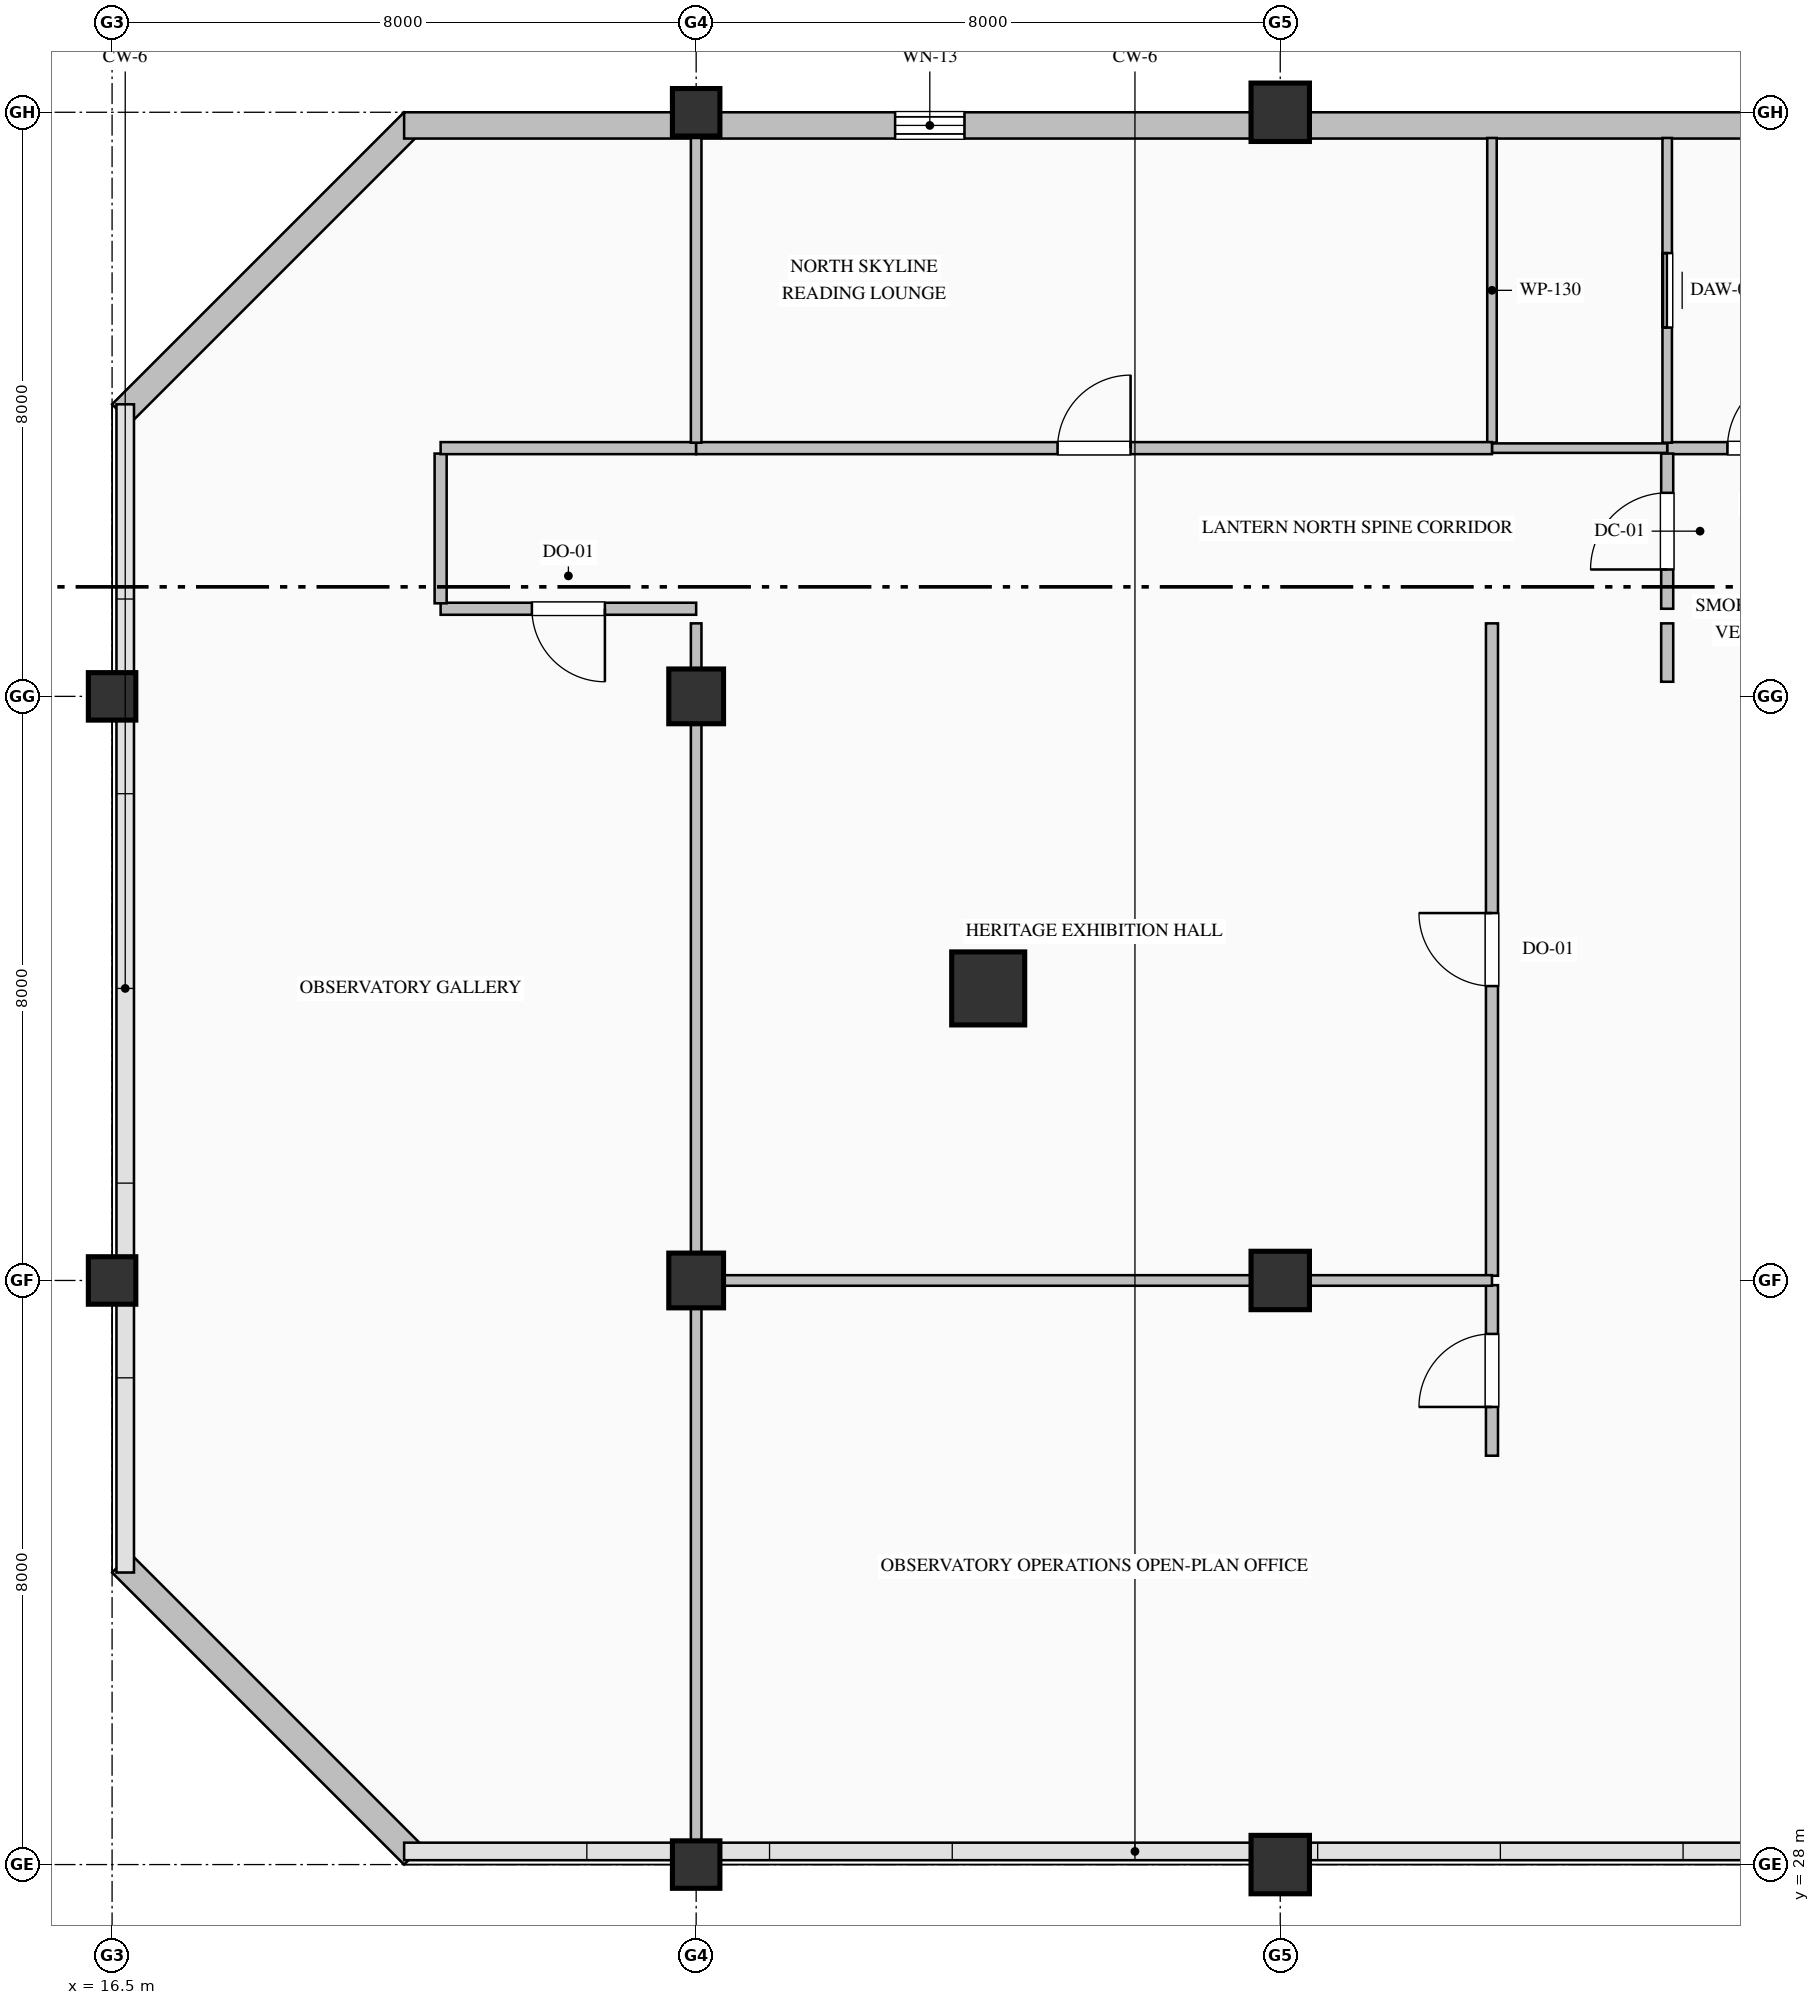
"""IFC4 building model, lengths in metres.
Left out: names, types, materials, properties, quantities, classifications, styles, units other than length and angle.
Written with IfcOpenShell. Run it as: python <this file> out.ifc"""

import sys

from ifc_helpers import new_model, si_unit, direction, frame, frame_2d, origin, origin_2d, place, context, subcontext, project, spatial, rectangle, hollow_rectangle, hollow_circle, extrude, element, fill, save


model = new_model("IFC4")
c1 = context("Model", 3, precision=1e-05, world=origin(), true_north=direction((0.0, 1.0)))
c2 = subcontext(c1, "Body", "Model", "MODEL_VIEW")
j1 = project(units=[si_unit("LENGTHUNIT", "METRE"), si_unit("PLANEANGLEUNIT", "RADIAN")], contexts=[c1])
p1 = place(None, origin())
s1 = spatial("IfcSite", under=j1, at=p1, CompositionType="ELEMENT")
p2 = place(p1, origin())
s2 = spatial("IfcBuilding", under=s1, at=p2, CompositionType="ELEMENT")
p3 = place(p2, frame((0.0, 0.0, 373.0)))
s3 = spatial("IfcBuildingStorey", under=s2, at=p3, CompositionType="ELEMENT", Elevation=373.0)
for number, where, z_axis, x_axis in (
    (1, (16.5, 36.0, 0.0), (0.0, 0.0, 1.0), (1.0, 0.0, 0.0)),
    (2, (16.5, 44.0, 0.0), (0.0, 0.0, 1.0), (1.0, 0.0, 0.0)),
    (3, (24.5, 28.0, 0.0), (0.0, 0.0, 1.0), (1.0, 0.0, 0.0)),
):
    element("IfcColumn", number, at=place(p3, frame(where, z_axis=z_axis, x_axis=x_axis)), inside=s3, PredefinedType="COLUMN", context=c2, shape_type="SweptSolid", body=[
        extrude(hollow_rectangle(XDim=0.65, YDim=0.65, WallThickness=0.028, at=origin_2d()), origin(), (0.0, 0.0, 1.0), 5.4),
    ])
for number, where, z_axis, x_axis in (
    (4, (24.5, 36.0, 0.0), (0.0, 0.0, 1.0), (1.0, 0.0, 0.0)),
    (5, (24.5, 44.0, 0.0), (0.0, 0.0, 1.0), (1.0, 0.0, 0.0)),
):
    element("IfcColumn", number, at=place(p3, frame(where, z_axis=z_axis, x_axis=x_axis)), inside=s3, PredefinedType="COLUMN", context=c2, shape_type="SweptSolid", body=[
        extrude(rectangle(XDim=0.75, YDim=0.75, at=origin_2d()), origin(), (0.0, 0.0, 1.0), 5.4),
    ])
p4 = place(p3, frame((24.5, 52.0, 0.0), z_axis=(0.0, 0.0, 1.0), x_axis=(1.0, 0.0, 0.0)))
e6 = element("IfcColumn", 6, at=p4, inside=s3, PredefinedType="COLUMN", context=c2, shape_type="SweptSolid", body=[
    extrude(hollow_rectangle(XDim=0.65, YDim=0.65, WallThickness=0.028, at=origin_2d()), origin(), (0.0, 0.0, 1.0), 5.4),
])
for number, where, z_axis, x_axis in (
    (7, (32.5, 28.0, 0.0), (0.0, 0.0, 1.0), (1.0, 0.0, 0.0)),
    (8, (32.5, 36.0, 0.0), (0.0, 0.0, 1.0), (1.0, 0.0, 0.0)),
    (9, (32.5, 52.0, 0.0), (0.0, 0.0, 1.0), (1.0, 0.0, 0.0)),
):
    element("IfcColumn", number, at=place(p3, frame(where, z_axis=z_axis, x_axis=x_axis)), inside=s3, PredefinedType="COLUMN", context=c2, shape_type="SweptSolid", body=[
        extrude(hollow_rectangle(XDim=0.8, YDim=0.8, WallThickness=0.032, at=origin_2d()), origin(), (0.0, 0.0, 1.0), 5.4),
    ])
for number, where, z_axis, x_axis in (
    (10, (20.627, 28.127, 0.0), (0.0, 0.0, 1.0), (-0.707, 0.707, 0.0)),
    (11, (16.627, 47.873, 0.0), (0.0, 0.0, 1.0), (0.707, 0.707, 0.0)),
):
    element("IfcWall", number, at=place(p3, frame(where, z_axis=z_axis, x_axis=x_axis)), inside=s3, PredefinedType="SOLIDWALL", context=c2, shape_type="SweptSolid", body=[
        extrude(rectangle(XDim=5.657, YDim=0.36, at=frame_2d((2.828, 0.0))), origin(), (0.0, 0.0, 1.0), 5.11),
    ])
p5 = place(p3, frame((20.5, 51.82, 0.0), z_axis=(0.0, 0.0, 1.0), x_axis=(1.0, 0.0, 0.0)))
e12 = element("IfcWall", 12, at=p5, inside=s3, PredefinedType="SOLIDWALL", context=c2, shape_type="SweptSolid", body=[
    extrude(rectangle(XDim=20.02, YDim=0.36, at=frame_2d((10.01, 0.0))), origin(), (0.0, 0.0, 1.0), 4.66),
])
p6 = place(p5, frame((6.725, 0.0, 0.9)))
e13 = element("IfcOpeningElement", 13, at=p6, cuts=e12, PredefinedType="OPENING", context=c2, shape_type="SweptSolid", body=[
    extrude(rectangle(XDim=0.95, YDim=1.85, at=frame_2d((0.475, 0.925))), frame((0.0, 0.19, 0.0), z_axis=(0.0, -1.0, 0.0), x_axis=(1.0, 0.0, 0.0)), (0.0, 0.0, 1.0), 0.38),
])
p7 = place(p3, frame((28.5, 40.0, 0.0), z_axis=(0.0, 0.0, 1.0), x_axis=(1.0, 0.0, 0.0)))
e14 = element("IfcColumn", 14, at=p7, inside=s3, PredefinedType="COLUMN", context=c2, shape_type="SweptSolid", body=[
    extrude(hollow_circle(Radius=0.5, WallThickness=0.036, at=origin_2d()), origin(), (0.0, 0.0, 1.0), 3.2),
])
p8 = place(p3, frame((37.8, 47.4, 0.0), z_axis=(0.0, 0.0, 1.0), x_axis=(1.0, 0.0, 0.0)))
e15 = element("IfcWall", 15, at=p8, inside=s3, PredefinedType="PARTITIONING", context=c2, shape_type="SweptSolid", body=[
    extrude(rectangle(XDim=2.7, YDim=0.165, at=frame_2d((1.35, 0.0))), origin(), (0.0, 0.0, 1.0), 5.11),
])
p9 = place(p8, frame((0.825, 0.0, 0.0)))
e16 = element("IfcOpeningElement", 16, at=p9, cuts=e15, PredefinedType="OPENING", context=c2, shape_type="SweptSolid", body=[
    extrude(rectangle(XDim=1.05, YDim=2.15, at=frame_2d((0.525, 1.075))), frame((0.0, 0.093, 0.0), z_axis=(0.0, -1.0, 0.0), x_axis=(1.0, 0.0, 0.0)), (0.0, 0.0, 1.0), 0.185),
])
p10 = place(p3, frame((37.8, 45.2, 0.0), z_axis=(0.0, 0.0, 1.0), x_axis=(0.0, 1.0, 0.0)))
e17 = element("IfcWall", 17, at=p10, inside=s3, PredefinedType="PARTITIONING", context=c2, shape_type="SweptSolid", body=[
    extrude(rectangle(XDim=2.125, YDim=0.165, at=frame_2d((1.063, 0.0))), origin(), (0.0, 0.0, 1.0), 5.11),
])
p11 = place(p10, frame((0.538, 0.0, 0.0)))
e18 = element("IfcOpeningElement", 18, at=p11, cuts=e17, PredefinedType="OPENING", context=c2, shape_type="SweptSolid", body=[
    extrude(rectangle(XDim=1.05, YDim=2.15, at=frame_2d((0.525, 1.075))), frame((0.0, 0.093, 0.0), z_axis=(0.0, -1.0, 0.0), x_axis=(1.0, 0.0, 0.0)), (0.0, 0.0, 1.0), 0.185),
])
p12 = place(p3, frame((37.8, 44.2, 0.0), z_axis=(0.0, 0.0, 1.0), x_axis=(0.0, 1.0, 0.0)))
e19 = element("IfcWall", 19, at=p12, inside=s3, PredefinedType="PARTITIONING", context=c2, shape_type="SweptSolid", body=[
    extrude(rectangle(XDim=0.8, YDim=0.165, at=frame_2d((0.4, 0.0))), origin(), (0.0, 0.0, 1.0), 5.11),
])
p13 = place(p3, frame((37.8, 47.475, 0.0), z_axis=(0.0, 0.0, 1.0), x_axis=(0.0, 1.0, 0.0)))
e20 = element("IfcWall", 20, at=p13, inside=s3, PredefinedType="PARTITIONING", context=c2, shape_type="SweptSolid", body=[
    extrude(rectangle(XDim=4.173, YDim=0.13, at=frame_2d((2.087, 0.0))), origin(), (0.0, 0.0, 1.0), 5.11),
])
p14 = place(p13, frame((1.577, 0.0, 0.0)))
e21 = element("IfcOpeningElement", 21, at=p14, cuts=e20, PredefinedType="OPENING", context=c2, shape_type="SweptSolid", body=[
    extrude(rectangle(XDim=1.02, YDim=2.15, at=frame_2d((0.51, 1.075))), frame((0.0, 0.075, 0.0), z_axis=(0.0, -1.0, 0.0), x_axis=(1.0, 0.0, 0.0)), (0.0, 0.0, 1.0), 0.15),
])
p15 = place(p3, frame((37.8, 47.4, 0.0), z_axis=(0.0, 0.0, 1.0), x_axis=(-1.0, 0.0, 0.0)))
e22 = element("IfcWall", 22, at=p15, inside=s3, PredefinedType="PARTITIONING", context=c2, shape_type="SweptSolid", body=[
    extrude(rectangle(XDim=2.4, YDim=0.13, at=frame_2d((1.2, 0.0))), origin(), (0.0, 0.0, 1.0), 5.11),
])
p16 = place(p3, frame((35.4, 47.475, 0.0), z_axis=(0.0, 0.0, 1.0), x_axis=(0.0, 1.0, 0.0)))
e23 = element("IfcWall", 23, at=p16, inside=s3, PredefinedType="PARTITIONING", context=c2, shape_type="SweptSolid", body=[
    extrude(rectangle(XDim=4.173, YDim=0.13, at=frame_2d((2.087, 0.0))), origin(), (0.0, 0.0, 1.0), 5.11),
])
p17 = place(p3, frame((24.5, 45.2, 0.0), z_axis=(0.0, 0.0, 1.0), x_axis=(-1.0, 0.0, 0.0)))
e24 = element("IfcWall", 24, at=p17, inside=s3, PredefinedType="PARTITIONING", context=c2, shape_type="SweptSolid", body=[
    extrude(rectangle(XDim=3.5, YDim=0.165, at=frame_2d((1.75, 0.0))), origin(), (0.0, 0.0, 1.0), 5.11),
])
p18 = place(p17, frame((1.25, 0.0, 0.0)))
e25 = element("IfcOpeningElement", 25, at=p18, cuts=e24, PredefinedType="OPENING", context=c2, shape_type="SweptSolid", body=[
    extrude(rectangle(XDim=1.0, YDim=2.15, at=frame_2d((0.5, 1.075))), frame((0.0, 0.093, 0.0), z_axis=(0.0, -1.0, 0.0), x_axis=(1.0, 0.0, 0.0)), (0.0, 0.0, 1.0), 0.185),
])
p19 = place(p3, frame((21.0, 45.274, 0.0), z_axis=(0.0, 0.0, 1.0), x_axis=(0.0, 1.0, 0.0)))
e26 = element("IfcWall", 26, at=p19, inside=s3, PredefinedType="PARTITIONING", context=c2, shape_type="SweptSolid", body=[
    extrude(rectangle(XDim=2.051, YDim=0.165, at=frame_2d((1.025, 0.0))), origin(), (0.0, 0.0, 1.0), 5.11),
])
p20 = place(p3, frame((21.0, 47.4, 0.0), z_axis=(0.0, 0.0, 1.0), x_axis=(1.0, 0.0, 0.0)))
e27 = element("IfcWall", 27, at=p20, inside=s3, PredefinedType="PARTITIONING", context=c2, shape_type="SweptSolid", body=[
    extrude(rectangle(XDim=3.5, YDim=0.165, at=frame_2d((1.75, 0.0))), origin(), (0.0, 0.0, 1.0), 5.11),
])
p21 = place(p3, frame((24.5, 47.4, 0.0), z_axis=(0.0, 0.0, 1.0), x_axis=(1.0, 0.0, 0.0)))
e28 = element("IfcWall", 28, at=p21, inside=s3, PredefinedType="PARTITIONING", context=c2, shape_type="SweptSolid", body=[
    extrude(rectangle(XDim=10.9, YDim=0.165, at=frame_2d((5.45, 0.0))), origin(), (0.0, 0.0, 1.0), 5.11),
])
p22 = place(p21, frame((4.95, 0.0, 0.0)))
e29 = element("IfcOpeningElement", 29, at=p22, cuts=e28, PredefinedType="OPENING", context=c2, shape_type="SweptSolid", body=[
    extrude(rectangle(XDim=1.0, YDim=2.15, at=frame_2d((0.5, 1.075))), frame((0.0, 0.093, 0.0), z_axis=(0.0, -1.0, 0.0), x_axis=(1.0, 0.0, 0.0)), (0.0, 0.0, 1.0), 0.185),
])
p23 = place(p3, frame((35.4, 36.064, 0.0), z_axis=(0.0, 0.0, 1.0), x_axis=(0.0, 1.0, 0.0)))
e30 = element("IfcWall", 30, at=p23, inside=s3, PredefinedType="PARTITIONING", context=c2, shape_type="SweptSolid", body=[
    extrude(rectangle(XDim=8.936, YDim=0.165, at=frame_2d((4.468, 0.0))), origin(), (0.0, 0.0, 1.0), 5.11),
])
p24 = place(p23, frame((3.968, 0.0, 0.0)))
e31 = element("IfcOpeningElement", 31, at=p24, cuts=e30, PredefinedType="OPENING", context=c2, shape_type="SweptSolid", body=[
    extrude(rectangle(XDim=1.0, YDim=2.15, at=frame_2d((0.5, 1.075))), frame((0.0, 0.093, 0.0), z_axis=(0.0, -1.0, 0.0), x_axis=(1.0, 0.0, 0.0)), (0.0, 0.0, 1.0), 0.185),
])
p25 = place(p3, frame((35.4, 33.6, 0.0), z_axis=(0.0, 0.0, 1.0), x_axis=(0.0, 1.0, 0.0)))
e32 = element("IfcWall", 32, at=p25, inside=s3, PredefinedType="PARTITIONING", context=c2, shape_type="SweptSolid", body=[
    extrude(rectangle(XDim=2.335, YDim=0.165, at=frame_2d((1.168, 0.0))), origin(), (0.0, 0.0, 1.0), 5.11),
])
p26 = place(p25, frame((0.668, 0.0, 0.0)))
e33 = element("IfcOpeningElement", 33, at=p26, cuts=e32, PredefinedType="OPENING", context=c2, shape_type="SweptSolid", body=[
    extrude(rectangle(XDim=1.0, YDim=2.15, at=frame_2d((0.5, 1.075))), frame((0.0, 0.093, 0.0), z_axis=(0.0, -1.0, 0.0), x_axis=(1.0, 0.0, 0.0)), (0.0, 0.0, 1.0), 0.185),
])
p27 = place(p3, frame((24.5, 36.064, 0.0), z_axis=(0.0, 0.0, 1.0), x_axis=(0.0, 1.0, 0.0)))
e34 = element("IfcWall", 34, at=p27, inside=s3, PredefinedType="PARTITIONING", context=c2, shape_type="SweptSolid", body=[
    extrude(rectangle(XDim=8.936, YDim=0.145, at=frame_2d((4.468, 0.0))), origin(), (0.0, 0.0, 1.0), 4.502),
])
p28 = place(p3, frame((35.4, 36.0, 0.0), z_axis=(0.0, 0.0, 1.0), x_axis=(-1.0, 0.0, 0.0)))
e35 = element("IfcWall", 35, at=p28, inside=s3, PredefinedType="PARTITIONING", context=c2, shape_type="SweptSolid", body=[
    extrude(rectangle(XDim=10.9, YDim=0.145, at=frame_2d((5.45, 0.0))), origin(), (0.0, 0.0, 1.0), 4.502),
])
p29 = place(p3, frame((24.5, 51.648, 0.0), z_axis=(0.0, 0.0, 1.0), x_axis=(0.0, -1.0, 0.0)))
e36 = element("IfcWall", 36, at=p29, inside=s3, PredefinedType="PARTITIONING", context=c2, shape_type="SweptSolid", body=[
    extrude(rectangle(XDim=4.173, YDim=0.145, at=frame_2d((2.087, 0.0))), origin(), (0.0, 0.0, 1.0), 4.502),
])
p30 = place(p3, frame((24.5, 35.936, 0.0), z_axis=(0.0, 0.0, 1.0), x_axis=(0.0, -1.0, 0.0)))
e37 = element("IfcWall", 37, at=p30, inside=s3, PredefinedType="PARTITIONING", context=c2, shape_type="SweptSolid", body=[
    extrude(rectangle(XDim=7.654, YDim=0.145, at=frame_2d((3.827, 0.0))), origin(), (0.0, 0.0, 1.0), 4.502),
])
p31 = place(p6, origin())
e38 = element("IfcWindow", 38, at=p31, inside=s3, PartitioningType="SINGLE_PANEL", PredefinedType="WINDOW", context=c2, shape_type="SweptSolid", body=[
    extrude(rectangle(XDim=0.95, YDim=1.85, at=frame_2d((0.475, 0.925))), frame((0.0, 0.15, 0.0), z_axis=(0.0, -1.0, 0.0), x_axis=(1.0, 0.0, 0.0)), (0.0, 0.0, 1.0), 0.06),
])
fill(e13, e38)
p32 = place(p9, origin())
e39 = element("IfcDoor", 39, at=p32, inside=s3, OperationType="SINGLE_SWING_RIGHT", PredefinedType="DOOR", context=c2, shape_type="SweptSolid", body=[
    extrude(rectangle(XDim=1.05, YDim=2.15, at=frame_2d((0.525, 1.075))), frame((0.0, 0.025, 0.0), z_axis=(0.0, -1.0, 0.0), x_axis=(1.0, 0.0, 0.0)), (0.0, 0.0, 1.0), 0.05),
])
fill(e16, e39)
p33 = place(p11, origin())
e40 = element("IfcDoor", 40, at=p33, inside=s3, OperationType="SINGLE_SWING_LEFT", PredefinedType="DOOR", context=c2, shape_type="SweptSolid", body=[
    extrude(rectangle(XDim=1.05, YDim=2.15, at=frame_2d((0.525, 1.075))), frame((0.0, 0.025, 0.0), z_axis=(0.0, -1.0, 0.0), x_axis=(1.0, 0.0, 0.0)), (0.0, 0.0, 1.0), 0.05),
])
fill(e18, e40)
p34 = place(p14, origin())
e41 = element("IfcDoor", 41, at=p34, inside=s3, OperationType="SLIDING_TO_LEFT", PredefinedType="DOOR", context=c2, shape_type="SweptSolid", body=[
    extrude(rectangle(XDim=1.02, YDim=2.15, at=frame_2d((0.51, 1.075))), frame((0.0, 0.025, 0.0), z_axis=(0.0, -1.0, 0.0), x_axis=(1.0, 0.0, 0.0)), (0.0, 0.0, 1.0), 0.05),
])
fill(e21, e41)
p35 = place(p24, origin())
e42 = element("IfcDoor", 42, at=p35, inside=s3, OperationType="SINGLE_SWING_RIGHT", PredefinedType="DOOR", context=c2, shape_type="SweptSolid", body=[
    extrude(rectangle(XDim=1.0, YDim=2.15, at=frame_2d((0.5, 1.075))), frame((0.0, 0.025, 0.0), z_axis=(0.0, -1.0, 0.0), x_axis=(1.0, 0.0, 0.0)), (0.0, 0.0, 1.0), 0.05),
])
fill(e31, e42)
p36 = place(p18, origin())
e43 = element("IfcDoor", 43, at=p36, inside=s3, OperationType="SINGLE_SWING_LEFT", PredefinedType="DOOR", context=c2, shape_type="SweptSolid", body=[
    extrude(rectangle(XDim=1.0, YDim=2.15, at=frame_2d((0.5, 1.075))), frame((0.0, 0.025, 0.0), z_axis=(0.0, -1.0, 0.0), x_axis=(1.0, 0.0, 0.0)), (0.0, 0.0, 1.0), 0.05),
])
fill(e25, e43)
p37 = place(p22, origin())
e44 = element("IfcDoor", 44, at=p37, inside=s3, OperationType="SINGLE_SWING_RIGHT", PredefinedType="DOOR", context=c2, shape_type="SweptSolid", body=[
    extrude(rectangle(XDim=1.0, YDim=2.15, at=frame_2d((0.5, 1.075))), frame((0.0, 0.025, 0.0), z_axis=(0.0, -1.0, 0.0), x_axis=(1.0, 0.0, 0.0)), (0.0, 0.0, 1.0), 0.05),
])
fill(e29, e44)
p38 = place(p26, origin())
e45 = element("IfcDoor", 45, at=p38, inside=s3, OperationType="SINGLE_SWING_LEFT", PredefinedType="DOOR", context=c2, shape_type="SweptSolid", body=[
    extrude(rectangle(XDim=1.0, YDim=2.15, at=frame_2d((0.5, 1.075))), frame((0.0, 0.025, 0.0), z_axis=(0.0, -1.0, 0.0), x_axis=(1.0, 0.0, 0.0)), (0.0, 0.0, 1.0), 0.05),
])
fill(e33, e45)
save(model, sys.argv[1])
